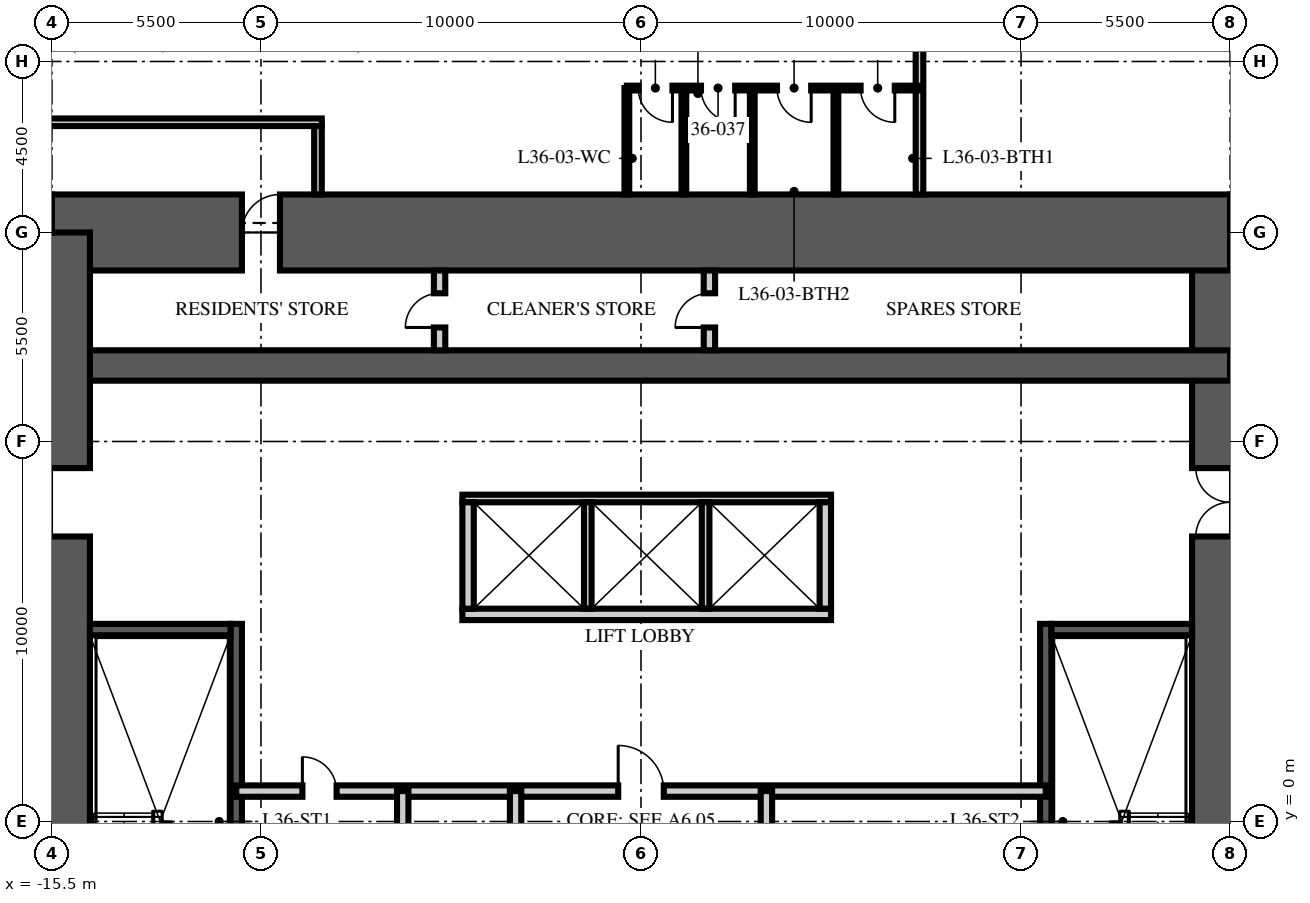
"""IFC4 building model, lengths in metres.
Left out: names, types, materials, properties, quantities, classifications, styles, units other than length and angle.
Written with IfcOpenShell. Run it as: python <this file> out.ifc"""

import sys

from ifc_helpers import new_model, si_unit, direction, frame, frame_2d, origin, place, context, subcontext, project, spatial, rectangle, extrude, element, fill, save


model = new_model("IFC4")
c1 = context("Model", 3, precision=1e-05, world=origin(), true_north=direction((0.0, 1.0)))
c2 = subcontext(c1, "Body", "Model", "MODEL_VIEW")
j1 = project(units=[si_unit("LENGTHUNIT", "METRE"), si_unit("PLANEANGLEUNIT", "RADIAN")], contexts=[c1])
p1 = place(None, origin())
s1 = spatial("IfcSite", under=j1, at=p1, CompositionType="ELEMENT")
p2 = place(p1, origin())
s2 = spatial("IfcBuilding", under=s1, at=p2, CompositionType="ELEMENT")
p3 = place(p2, frame((0.0, 0.0, 144.75)))
s3 = spatial("IfcBuildingStorey", under=s2, at=p3, CompositionType="ELEMENT", Elevation=144.75)
p4 = place(p3, frame((15.5, -15.5, -0.25), z_axis=(0.0, 0.0, 1.0), x_axis=(0.0, 1.0, 0.0)))
e1 = element("IfcWall", 1, at=p4, inside=s3, PredefinedType="SHEAR", context=c2, shape_type="SweptSolid", body=[
    extrude(rectangle(XDim=31.0, YDim=2.0, at=frame_2d((15.5, 0.0))), origin(), (0.0, 0.0, 1.0), 3.75),
])
p5 = place(p4, frame((6.5, 0.0, 0.25)))
e2 = element("IfcOpeningElement", 2, at=p5, cuts=e1, PredefinedType="OPENING", context=c2, shape_type="SweptSolid", body=[
    extrude(rectangle(XDim=1.2, YDim=2.1, at=frame_2d((0.6, 1.05))), frame((0.0, 1.01, 0.0), z_axis=(0.0, -1.0, 0.0), x_axis=(1.0, 0.0, 0.0)), (0.0, 0.0, 1.0), 2.02),
])
p6 = place(p4, frame((23.0, 0.0, 0.25)))
e3 = element("IfcOpeningElement", 3, at=p6, cuts=e1, PredefinedType="OPENING", context=c2, shape_type="SweptSolid", body=[
    extrude(rectangle(XDim=1.8, YDim=2.1, at=frame_2d((0.9, 1.05))), frame((0.0, 1.01, 0.0), z_axis=(0.0, -1.0, 0.0), x_axis=(1.0, 0.0, 0.0)), (0.0, 0.0, 1.0), 2.02),
])
p7 = place(p3, frame((-15.5, 15.5, -0.25), z_axis=(0.0, 0.0, 1.0), x_axis=(1.0, 0.0, 0.0)))
e4 = element("IfcWall", 4, at=p7, inside=s3, PredefinedType="SHEAR", context=c2, shape_type="SweptSolid", body=[
    extrude(rectangle(XDim=31.0, YDim=2.0, at=frame_2d((15.5, 0.0))), origin(), (0.0, 0.0, 1.0), 3.75),
])
p8 = place(p7, frame((5.0, 0.0, 0.25)))
e5 = element("IfcOpeningElement", 5, at=p8, cuts=e4, PredefinedType="OPENING", context=c2, shape_type="SweptSolid", body=[
    extrude(rectangle(XDim=1.0, YDim=2.1, at=frame_2d((0.5, 1.05))), frame((0.0, 1.01, 0.0), z_axis=(0.0, -1.0, 0.0), x_axis=(1.0, 0.0, 0.0)), (0.0, 0.0, 1.0), 2.02),
])
p9 = place(p3, frame((-15.5, 12.0, -0.25), z_axis=(0.0, 0.0, 1.0), x_axis=(1.0, 0.0, 0.0)))
e6 = element("IfcWall", 6, at=p9, inside=s3, PredefinedType="SHEAR", context=c2, shape_type="SweptSolid", body=[
    extrude(rectangle(XDim=31.0, YDim=0.8, at=frame_2d((15.5, 0.0))), origin(), (0.0, 0.0, 1.0), 3.75),
])
p10 = place(p3, frame((-15.5, -15.5, -0.25), z_axis=(0.0, 0.0, 1.0), x_axis=(0.0, 1.0, 0.0)))
e7 = element("IfcWall", 7, at=p10, inside=s3, PredefinedType="SHEAR", context=c2, shape_type="SweptSolid", body=[
    extrude(rectangle(XDim=31.0, YDim=2.0, at=frame_2d((15.5, 0.0))), origin(), (0.0, 0.0, 1.0), 3.75),
])
p11 = place(p10, frame((6.5, 0.0, 0.25)))
e8 = element("IfcOpeningElement", 8, at=p11, cuts=e7, PredefinedType="OPENING", context=c2, shape_type="SweptSolid", body=[
    extrude(rectangle(XDim=1.2, YDim=2.1, at=frame_2d((0.6, 1.05))), frame((0.0, 1.01, 0.0), z_axis=(0.0, -1.0, 0.0), x_axis=(1.0, 0.0, 0.0)), (0.0, 0.0, 1.0), 2.02),
])
p12 = place(p10, frame((23.0, 0.0, 0.25)))
e9 = element("IfcOpeningElement", 9, at=p12, cuts=e7, PredefinedType="OPENING", context=c2, shape_type="SweptSolid", body=[
    extrude(rectangle(XDim=1.8, YDim=2.1, at=frame_2d((0.9, 1.05))), frame((0.0, 1.01, 0.0), z_axis=(0.0, -1.0, 0.0), x_axis=(1.0, 0.0, 0.0)), (0.0, 0.0, 1.0), 2.02),
])
p13 = place(p3, frame((-10.65, -4.9, 0.0), z_axis=(0.0, 0.0, 1.0), x_axis=(0.0, 1.0, 0.0)))
e10 = element("IfcWall", 10, at=p13, inside=s3, PredefinedType="SOLIDWALL", context=c2, shape_type="SweptSolid", body=[
    extrude(rectangle(XDim=10.1, YDim=0.3, at=frame_2d((5.05, 0.0))), origin(), (0.0, 0.0, 1.0), 3.5),
])
p14 = place(p3, frame((-14.5, 5.05, 0.0), z_axis=(0.0, 0.0, 1.0), x_axis=(1.0, 0.0, 0.0)))
e11 = element("IfcWall", 11, at=p14, inside=s3, PredefinedType="SOLIDWALL", context=c2, shape_type="SweptSolid", body=[
    extrude(rectangle(XDim=3.7, YDim=0.3, at=frame_2d((1.85, 0.0))), origin(), (0.0, 0.0, 1.0), 3.5),
])
p15 = place(p3, frame((10.65, -4.9, 0.0), z_axis=(0.0, 0.0, 1.0), x_axis=(0.0, 1.0, 0.0)))
e12 = element("IfcWall", 12, at=p15, inside=s3, PredefinedType="SOLIDWALL", context=c2, shape_type="SweptSolid", body=[
    extrude(rectangle(XDim=10.1, YDim=0.3, at=frame_2d((5.05, 0.0))), origin(), (0.0, 0.0, 1.0), 3.5),
])
p16 = place(p3, frame((14.5, 5.05, 0.0), z_axis=(0.0, 0.0, 1.0), x_axis=(-1.0, 0.0, 0.0)))
e13 = element("IfcWall", 13, at=p16, inside=s3, PredefinedType="SOLIDWALL", context=c2, shape_type="SweptSolid", body=[
    extrude(rectangle(XDim=3.7, YDim=0.3, at=frame_2d((1.85, 0.0))), origin(), (0.0, 0.0, 1.0), 3.5),
])
p17 = place(p3, frame((-4.7, 5.45, 0.0), z_axis=(0.0, 0.0, 1.0), x_axis=(1.0, 0.0, 0.0)))
e14 = element("IfcWall", 14, at=p17, inside=s3, PredefinedType="PARTITIONING", context=c2, shape_type="SweptSolid", body=[
    extrude(rectangle(XDim=9.7, YDim=0.3, at=frame_2d((4.85, 0.0))), origin(), (0.0, 0.0, 1.0), 3.5),
])
p18 = place(p3, frame((-4.7, 8.5, 0.0), z_axis=(0.0, 0.0, 1.0), x_axis=(1.0, 0.0, 0.0)))
e15 = element("IfcWall", 15, at=p18, inside=s3, PredefinedType="PARTITIONING", context=c2, shape_type="SweptSolid", body=[
    extrude(rectangle(XDim=9.7, YDim=0.2, at=frame_2d((4.85, 0.0))), origin(), (0.0, 0.0, 1.0), 3.5),
])
for number, where, z_axis, x_axis in (
    (16, (-4.55, 5.6, 0.0), (0.0, 0.0, 1.0), (0.0, 1.0, 0.0)),
    (17, (4.85, 5.6, 0.0), (0.0, 0.0, 1.0), (0.0, 1.0, 0.0)),
):
    element("IfcWall", number, at=place(p3, frame(where, z_axis=z_axis, x_axis=x_axis)), inside=s3, PredefinedType="PARTITIONING", context=c2, shape_type="SweptSolid", body=[
        extrude(rectangle(XDim=2.8, YDim=0.3, at=frame_2d((1.4, 0.0))), origin(), (0.0, 0.0, 1.0), 3.5),
    ])
for number, where, z_axis, x_axis in (
    (18, (-1.4, 5.6, 0.0), (0.0, 0.0, 1.0), (0.0, 1.0, 0.0)),
    (19, (1.7, 5.6, 0.0), (0.0, 0.0, 1.0), (0.0, 1.0, 0.0)),
):
    element("IfcWall", number, at=place(p3, frame(where, z_axis=z_axis, x_axis=x_axis)), inside=s3, PredefinedType="PARTITIONING", context=c2, shape_type="SweptSolid", body=[
        extrude(rectangle(XDim=2.8, YDim=0.2, at=frame_2d((1.4, 0.0))), origin(), (0.0, 0.0, 1.0), 3.5),
    ])
p19 = place(p3, frame((-10.65, 0.8, 0.0), z_axis=(0.0, 0.0, 1.0), x_axis=(1.0, 0.0, 0.0)))
e20 = element("IfcWall", 20, at=p19, inside=s3, PredefinedType="PARTITIONING", context=c2, shape_type="SweptSolid", body=[
    extrude(rectangle(XDim=21.3, YDim=0.3, at=frame_2d((10.65, 0.0))), origin(), (0.0, 0.0, 1.0), 3.5),
])
p20 = place(p19, frame((10.05, 0.0, 0.0)))
e21 = element("IfcOpeningElement", 21, at=p20, cuts=e20, PredefinedType="OPENING", context=c2, shape_type="SweptSolid", body=[
    extrude(rectangle(XDim=1.2, YDim=2.1, at=frame_2d((0.6, 1.05))), frame((0.0, 0.16, 0.0), z_axis=(0.0, -1.0, 0.0), x_axis=(1.0, 0.0, 0.0)), (0.0, 0.0, 1.0), 0.32),
])
p21 = place(p19, frame((1.74, 0.0, 0.0)))
e22 = element("IfcOpeningElement", 22, at=p21, cuts=e20, PredefinedType="OPENING", context=c2, shape_type="SweptSolid", body=[
    extrude(rectangle(XDim=0.9, YDim=2.1, at=frame_2d((0.45, 1.05))), frame((0.0, 0.16, 0.0), z_axis=(0.0, -1.0, 0.0), x_axis=(1.0, 0.0, 0.0)), (0.0, 0.0, 1.0), 0.32),
])
p22 = place(p3, frame((-3.3, -6.65, 0.0), z_axis=(0.0, 0.0, 1.0), x_axis=(0.0, 1.0, 0.0)))
e23 = element("IfcWall", 23, at=p22, inside=s3, PredefinedType="PARTITIONING", context=c2, shape_type="SweptSolid", body=[
    extrude(rectangle(XDim=7.45, YDim=0.3, at=frame_2d((3.725, 0.0))), origin(), (0.0, 0.0, 1.0), 3.5),
])
p23 = place(p22, frame((3.275, 0.0, 0.0)))
e24 = element("IfcOpeningElement", 24, at=p23, cuts=e23, PredefinedType="OPENING", context=c2, shape_type="SweptSolid", body=[
    extrude(rectangle(XDim=0.9, YDim=2.1, at=frame_2d((0.45, 1.05))), frame((0.0, 0.16, 0.0), z_axis=(0.0, -1.0, 0.0), x_axis=(1.0, 0.0, 0.0)), (0.0, 0.0, 1.0), 0.32),
])
p24 = place(p3, frame((3.3, -6.65, 0.0), z_axis=(0.0, 0.0, 1.0), x_axis=(0.0, 1.0, 0.0)))
e25 = element("IfcWall", 25, at=p24, inside=s3, PredefinedType="PARTITIONING", context=c2, shape_type="SweptSolid", body=[
    extrude(rectangle(XDim=7.45, YDim=0.3, at=frame_2d((3.725, 0.0))), origin(), (0.0, 0.0, 1.0), 3.5),
])
p25 = place(p24, frame((1.231, 0.0, 0.0)))
e26 = element("IfcOpeningElement", 26, at=p25, cuts=e25, PredefinedType="OPENING", context=c2, shape_type="SweptSolid", body=[
    extrude(rectangle(XDim=0.9, YDim=2.1, at=frame_2d((0.45, 1.05))), frame((0.0, 0.16, 0.0), z_axis=(0.0, -1.0, 0.0), x_axis=(1.0, 0.0, 0.0)), (0.0, 0.0, 1.0), 0.32),
])
p26 = place(p24, frame((4.956, 0.0, 0.0)))
e27 = element("IfcOpeningElement", 27, at=p26, cuts=e25, PredefinedType="OPENING", context=c2, shape_type="SweptSolid", body=[
    extrude(rectangle(XDim=0.9, YDim=2.1, at=frame_2d((0.45, 1.05))), frame((0.0, 0.16, 0.0), z_axis=(0.0, -1.0, 0.0), x_axis=(1.0, 0.0, 0.0)), (0.0, 0.0, 1.0), 0.32),
])
p27 = place(p3, frame((-6.27, -6.65, 0.0), z_axis=(0.0, 0.0, 1.0), x_axis=(0.0, 1.0, 0.0)))
e28 = element("IfcWall", 28, at=p27, inside=s3, PredefinedType="PARTITIONING", context=c2, shape_type="SweptSolid", body=[
    extrude(rectangle(XDim=7.45, YDim=0.3, at=frame_2d((3.725, 0.0))), origin(), (0.0, 0.0, 1.0), 3.5),
])
p28 = place(p3, frame((-5.3, 12.4, 0.0), z_axis=(0.0, 0.0, 1.0), x_axis=(0.0, 1.0, 0.0)))
e29 = element("IfcWall", 29, at=p28, inside=s3, PredefinedType="PARTITIONING", context=c2, shape_type="SweptSolid", body=[
    extrude(rectangle(XDim=2.1, YDim=0.3, at=frame_2d((1.05, 0.0))), origin(), (0.0, 0.0, 1.0), 3.5),
])
p29 = place(p28, frame((0.6, 0.0, 0.0)))
e30 = element("IfcOpeningElement", 30, at=p29, cuts=e29, PredefinedType="OPENING", context=c2, shape_type="SweptSolid", body=[
    extrude(rectangle(XDim=0.9, YDim=2.1, at=frame_2d((0.45, 1.05))), frame((0.0, 0.16, 0.0), z_axis=(0.0, -1.0, 0.0), x_axis=(1.0, 0.0, 0.0)), (0.0, 0.0, 1.0), 0.32),
])
p30 = place(p3, frame((1.8, 12.4, 0.0), z_axis=(0.0, 0.0, 1.0), x_axis=(0.0, 1.0, 0.0)))
e31 = element("IfcWall", 31, at=p30, inside=s3, PredefinedType="PARTITIONING", context=c2, shape_type="SweptSolid", body=[
    extrude(rectangle(XDim=2.1, YDim=0.3, at=frame_2d((1.05, 0.0))), origin(), (0.0, 0.0, 1.0), 3.5),
])
p31 = place(p30, frame((0.6, 0.0, 0.0)))
e32 = element("IfcOpeningElement", 32, at=p31, cuts=e31, PredefinedType="OPENING", context=c2, shape_type="SweptSolid", body=[
    extrude(rectangle(XDim=0.9, YDim=2.1, at=frame_2d((0.45, 1.05))), frame((0.0, 0.16, 0.0), z_axis=(0.0, -1.0, 0.0), x_axis=(1.0, 0.0, 0.0)), (0.0, 0.0, 1.0), 0.32),
])
p32 = place(p3, frame((-18.5, 18.4, 0.0), z_axis=(0.0, 0.0, 1.0), x_axis=(1.0, 0.0, 0.0)))
e33 = element("IfcWall", 33, at=p32, inside=s3, PredefinedType="PARTITIONING", context=c2, shape_type="SweptSolid", body=[
    extrude(rectangle(XDim=10.1, YDim=0.2, at=frame_2d((5.05, 0.0))), origin(), (0.0, 0.0, 1.0), 2.3),
])
p33 = place(p3, frame((-8.5, 18.3, 0.0), z_axis=(0.0, 0.0, 1.0), x_axis=(0.0, -1.0, 0.0)))
e34 = element("IfcWall", 34, at=p33, inside=s3, PredefinedType="PARTITIONING", context=c2, shape_type="SweptSolid", body=[
    extrude(rectangle(XDim=1.8, YDim=0.2, at=frame_2d((0.9, 0.0))), origin(), (0.0, 0.0, 1.0), 3.5),
])
p34 = place(p3, frame((7.328, 16.5, 0.0), z_axis=(0.0, 0.0, 1.0), x_axis=(0.0, 1.0, 0.0)))
e35 = element("IfcWall", 35, at=p34, inside=s3, PredefinedType="PARTITIONING", context=c2, shape_type="SweptSolid", body=[
    extrude(rectangle(XDim=12.15, YDim=0.2, at=frame_2d((6.075, 0.0))), origin(), (0.0, 0.0, 1.0), 2.81),
])
p35 = place(p3, frame((7.328, 19.3, 0.0), z_axis=(0.0, 0.0, 1.0), x_axis=(-1.0, 0.0, 0.0)))
e36 = element("IfcWall", 36, at=p35, inside=s3, PredefinedType="PARTITIONING", context=c2, shape_type="SweptSolid", body=[
    extrude(rectangle(XDim=7.7, YDim=0.125, at=frame_2d((3.85, 0.0))), origin(), (0.0, 0.0, 1.0), 2.7),
])
p36 = place(p35, frame((0.65, 0.0, 0.0)))
e37 = element("IfcOpeningElement", 37, at=p36, cuts=e36, PredefinedType="OPENING", context=c2, shape_type="SweptSolid", body=[
    extrude(rectangle(XDim=0.9, YDim=2.1, at=frame_2d((0.45, 1.05))), frame((0.0, 0.073, 0.0), z_axis=(0.0, -1.0, 0.0), x_axis=(1.0, 0.0, 0.0)), (0.0, 0.0, 1.0), 0.145),
])
p37 = place(p35, frame((2.85, 0.0, 0.0)))
e38 = element("IfcOpeningElement", 38, at=p37, cuts=e36, PredefinedType="OPENING", context=c2, shape_type="SweptSolid", body=[
    extrude(rectangle(XDim=0.9, YDim=2.1, at=frame_2d((0.45, 1.05))), frame((0.0, 0.073, 0.0), z_axis=(0.0, -1.0, 0.0), x_axis=(1.0, 0.0, 0.0)), (0.0, 0.0, 1.0), 0.145),
])
p38 = place(p35, frame((4.85, 0.0, 0.0)))
e39 = element("IfcOpeningElement", 39, at=p38, cuts=e36, PredefinedType="OPENING", context=c2, shape_type="SweptSolid", body=[
    extrude(rectangle(XDim=0.9, YDim=2.1, at=frame_2d((0.45, 1.05))), frame((0.0, 0.073, 0.0), z_axis=(0.0, -1.0, 0.0), x_axis=(1.0, 0.0, 0.0)), (0.0, 0.0, 1.0), 0.145),
])
p39 = place(p35, frame((6.5, 0.0, 0.0)))
e40 = element("IfcOpeningElement", 40, at=p39, cuts=e36, PredefinedType="OPENING", context=c2, shape_type="SweptSolid", body=[
    extrude(rectangle(XDim=0.9, YDim=2.1, at=frame_2d((0.45, 1.05))), frame((0.0, 0.073, 0.0), z_axis=(0.0, -1.0, 0.0), x_axis=(1.0, 0.0, 0.0)), (0.0, 0.0, 1.0), 0.145),
])
for number, where, z_axis, x_axis in (
    (41, (5.128, 16.5, 0.0), (0.0, 0.0, 1.0), (0.0, 1.0, 0.0)),
    (42, (2.928, 16.5, 0.0), (0.0, 0.0, 1.0), (0.0, 1.0, 0.0)),
    (43, (1.128, 16.5, 0.0), (0.0, 0.0, 1.0), (0.0, 1.0, 0.0)),
    (44, (-0.372, 16.5, 0.0), (0.0, 0.0, 1.0), (0.0, 1.0, 0.0)),
):
    element("IfcWall", number, at=place(p3, frame(where, z_axis=z_axis, x_axis=x_axis)), inside=s3, PredefinedType="PARTITIONING", context=c2, shape_type="SweptSolid", body=[
        extrude(rectangle(XDim=2.8, YDim=0.125, at=frame_2d((1.4, 0.0))), origin(), (0.0, 0.0, 1.0), 3.5),
    ])
p40 = place(p12, origin())
e45 = element("IfcDoor", 45, at=p40, inside=s3, OperationType="DOUBLE_DOOR_SINGLE_SWING", PredefinedType="DOOR", context=c2, shape_type="SweptSolid", body=[
    extrude(rectangle(XDim=1.8, YDim=2.1, at=frame_2d((0.9, 1.05))), frame((0.0, 0.025, 0.0), z_axis=(0.0, -1.0, 0.0), x_axis=(1.0, 0.0, 0.0)), (0.0, 0.0, 1.0), 0.05),
])
fill(e9, e45)
p41 = place(p6, origin())
e46 = element("IfcDoor", 46, at=p41, inside=s3, OperationType="DOUBLE_DOOR_SINGLE_SWING", PredefinedType="DOOR", context=c2, shape_type="SweptSolid", body=[
    extrude(rectangle(XDim=1.8, YDim=2.1, at=frame_2d((0.9, 1.05))), frame((0.0, 0.025, 0.0), z_axis=(0.0, -1.0, 0.0), x_axis=(1.0, 0.0, 0.0)), (0.0, 0.0, 1.0), 0.05),
])
fill(e3, e46)
p42 = place(p20, origin())
e47 = element("IfcDoor", 47, at=p42, inside=s3, OperationType="SINGLE_SWING_LEFT", PredefinedType="DOOR", context=c2, shape_type="SweptSolid", body=[
    extrude(rectangle(XDim=1.2, YDim=2.1, at=frame_2d((0.6, 1.05))), frame((0.0, 0.025, 0.0), z_axis=(0.0, -1.0, 0.0), x_axis=(1.0, 0.0, 0.0)), (0.0, 0.0, 1.0), 0.05),
])
fill(e21, e47)
p43 = place(p21, origin())
e48 = element("IfcDoor", 48, at=p43, inside=s3, OperationType="SINGLE_SWING_LEFT", PredefinedType="DOOR", context=c2, shape_type="SweptSolid", body=[
    extrude(rectangle(XDim=0.9, YDim=2.1, at=frame_2d((0.45, 1.05))), frame((0.0, 0.025, 0.0), z_axis=(0.0, -1.0, 0.0), x_axis=(1.0, 0.0, 0.0)), (0.0, 0.0, 1.0), 0.05),
])
fill(e22, e48)
p44 = place(p29, origin())
e49 = element("IfcDoor", 49, at=p44, inside=s3, OperationType="SINGLE_SWING_LEFT", PredefinedType="DOOR", context=c2, shape_type="SweptSolid", body=[
    extrude(rectangle(XDim=0.9, YDim=2.1, at=frame_2d((0.45, 1.05))), frame((0.0, 0.025, 0.0), z_axis=(0.0, -1.0, 0.0), x_axis=(1.0, 0.0, 0.0)), (0.0, 0.0, 1.0), 0.05),
])
fill(e30, e49)
p45 = place(p31, origin())
e50 = element("IfcDoor", 50, at=p45, inside=s3, OperationType="SINGLE_SWING_LEFT", PredefinedType="DOOR", context=c2, shape_type="SweptSolid", body=[
    extrude(rectangle(XDim=0.9, YDim=2.1, at=frame_2d((0.45, 1.05))), frame((0.0, 0.025, 0.0), z_axis=(0.0, -1.0, 0.0), x_axis=(1.0, 0.0, 0.0)), (0.0, 0.0, 1.0), 0.05),
])
fill(e32, e50)
p46 = place(p8, origin())
e51 = element("IfcDoor", 51, at=p46, inside=s3, OperationType="SINGLE_SWING_RIGHT", PredefinedType="DOOR", context=c2, shape_type="SweptSolid", body=[
    extrude(rectangle(XDim=1.0, YDim=2.1, at=frame_2d((0.5, 1.05))), frame((0.0, 0.025, 0.0), z_axis=(0.0, -1.0, 0.0), x_axis=(1.0, 0.0, 0.0)), (0.0, 0.0, 1.0), 0.05),
])
fill(e5, e51)
p47 = place(p36, origin())
e52 = element("IfcDoor", 52, at=p47, inside=s3, OperationType="SINGLE_SWING_LEFT", PredefinedType="DOOR", context=c2, shape_type="SweptSolid", body=[
    extrude(rectangle(XDim=0.9, YDim=2.1, at=frame_2d((0.45, 1.05))), frame((0.0, 0.025, 0.0), z_axis=(0.0, -1.0, 0.0), x_axis=(1.0, 0.0, 0.0)), (0.0, 0.0, 1.0), 0.05),
])
fill(e37, e52)
p48 = place(p37, origin())
e53 = element("IfcDoor", 53, at=p48, inside=s3, OperationType="SINGLE_SWING_LEFT", PredefinedType="DOOR", context=c2, shape_type="SweptSolid", body=[
    extrude(rectangle(XDim=0.9, YDim=2.1, at=frame_2d((0.45, 1.05))), frame((0.0, 0.025, 0.0), z_axis=(0.0, -1.0, 0.0), x_axis=(1.0, 0.0, 0.0)), (0.0, 0.0, 1.0), 0.05),
])
fill(e38, e53)
p49 = place(p38, origin())
e54 = element("IfcDoor", 54, at=p49, inside=s3, OperationType="SINGLE_SWING_LEFT", PredefinedType="DOOR", context=c2, shape_type="SweptSolid", body=[
    extrude(rectangle(XDim=0.9, YDim=2.1, at=frame_2d((0.45, 1.05))), frame((0.0, 0.025, 0.0), z_axis=(0.0, -1.0, 0.0), x_axis=(1.0, 0.0, 0.0)), (0.0, 0.0, 1.0), 0.05),
])
fill(e39, e54)
p50 = place(p39, origin())
e55 = element("IfcDoor", 55, at=p50, inside=s3, OperationType="SINGLE_SWING_LEFT", PredefinedType="DOOR", context=c2, shape_type="SweptSolid", body=[
    extrude(rectangle(XDim=0.9, YDim=2.1, at=frame_2d((0.45, 1.05))), frame((0.0, 0.025, 0.0), z_axis=(0.0, -1.0, 0.0), x_axis=(1.0, 0.0, 0.0)), (0.0, 0.0, 1.0), 0.05),
])
fill(e40, e55)
save(model, sys.argv[1])
